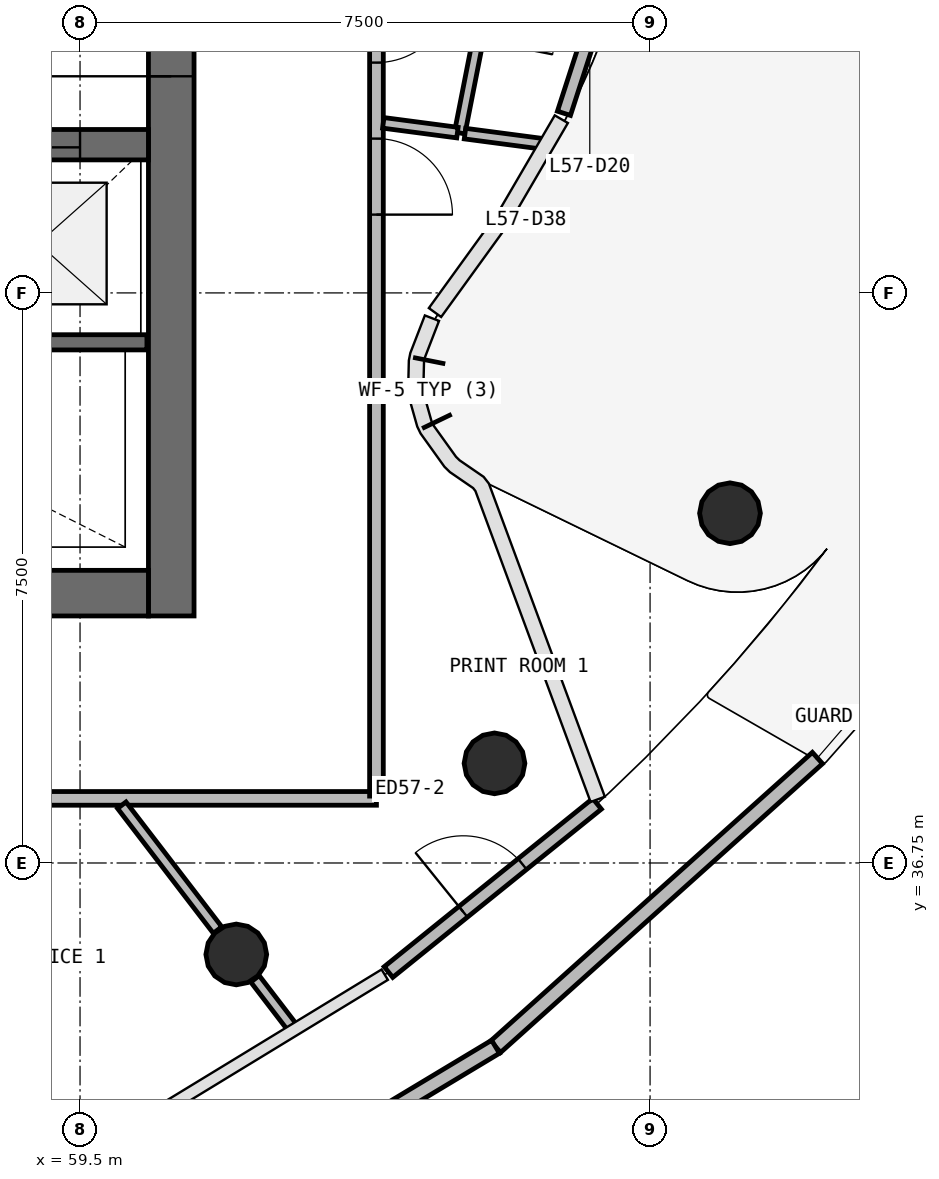
"""IFC4 building model, lengths in metres.
Left out: names, types, materials, properties, quantities, classifications, styles, units other than length and angle.
Written with IfcOpenShell. Run it as: python <this file> out.ifc"""

import sys

from ifc_helpers import new_model, si_unit, direction, frame, frame_2d, origin, origin_2d, place, context, subcontext, project, spatial, rectangle, circle, extrude, source, transform, mapped, element, fill, save


model = new_model("IFC4")
c1 = context("Model", 3, precision=1e-05, world=origin(), true_north=direction((0.0, 1.0)))
c2 = subcontext(c1, "Body", "Model", "MODEL_VIEW")
j1 = project(units=[si_unit("LENGTHUNIT", "METRE"), si_unit("PLANEANGLEUNIT", "RADIAN")], contexts=[c1])
p1 = place(None, origin())
s1 = spatial("IfcSite", under=j1, at=p1, CompositionType="ELEMENT")
p2 = place(p1, origin())
s2 = spatial("IfcBuilding", under=s1, at=p2, CompositionType="ELEMENT")
p3 = place(p2, frame((0.0, 0.0, 234.5)))
s3 = spatial("IfcBuildingStorey", under=s2, at=p3, CompositionType="ELEMENT", Elevation=234.5)
p4 = place(p3, frame((60.7, 40.0, 0.0), z_axis=(0.0, 0.0, 1.0), x_axis=(0.0, 1.0, 0.0)))
e1 = element("IfcWall", 1, at=p4, inside=s3, PredefinedType="SHEAR", context=c2, shape_type="SweptSolid", body=[
    extrude(rectangle(XDim=16.0, YDim=0.6, at=frame_2d((8.0, 0.0))), origin(), (0.0, 0.0, 1.0), 3.9),
])
p5 = place(p4, frame((7.1, 0.0, 0.0)))
e2 = element("IfcOpeningElement", 2, at=p5, cuts=e1, PredefinedType="OPENING", context=c2, shape_type="SweptSolid", body=[
    extrude(rectangle(XDim=1.8, YDim=2.1, at=frame_2d((0.9, 1.05))), frame((0.0, 0.31, 0.0), z_axis=(0.0, -1.0, 0.0), x_axis=(1.0, 0.0, 0.0)), (0.0, 0.0, 1.0), 0.62),
])
p6 = place(p3, frame((43.6, 40.3, 0.0), z_axis=(0.0, 0.0, 1.0), x_axis=(1.0, 0.0, 0.0)))
e3 = element("IfcWall", 3, at=p6, inside=s3, PredefinedType="SHEAR", context=c2, shape_type="SweptSolid", body=[
    extrude(rectangle(XDim=16.8, YDim=0.6, at=frame_2d((8.4, 0.0))), origin(), (0.0, 0.0, 1.0), 3.9),
])
p7 = place(p6, frame((10.3, 0.0, 0.0)))
e4 = element("IfcOpeningElement", 4, at=p7, cuts=e3, PredefinedType="OPENING", context=c2, shape_type="SweptSolid", body=[
    extrude(rectangle(XDim=1.2, YDim=2.1, at=frame_2d((0.6, 1.05))), frame((0.0, 0.31, 0.0), z_axis=(0.0, -1.0, 0.0), x_axis=(1.0, 0.0, 0.0)), (0.0, 0.0, 1.0), 0.62),
])
p8 = place(p6, frame((7.25, 0.0, 0.0)))
e5 = element("IfcOpeningElement", 5, at=p8, cuts=e3, PredefinedType="OPENING", context=c2, shape_type="SweptSolid", body=[
    extrude(rectangle(XDim=1.1, YDim=2.1, at=frame_2d((0.55, 1.05))), frame((0.0, 0.31, 0.0), z_axis=(0.0, -1.0, 0.0), x_axis=(1.0, 0.0, 0.0)), (0.0, 0.0, 1.0), 0.62),
])
p9 = place(p6, frame((0.7, 0.0, 0.0)))
e6 = element("IfcOpeningElement", 6, at=p9, cuts=e3, PredefinedType="OPENING", context=c2, shape_type="SweptSolid", body=[
    extrude(rectangle(XDim=0.8, YDim=2.1, at=frame_2d((0.4, 1.05))), frame((0.0, 0.31, 0.0), z_axis=(0.0, -1.0, 0.0), x_axis=(1.0, 0.0, 0.0)), (0.0, 0.0, 1.0), 0.62),
])
p10 = place(p3, frame((43.6, 46.2, 0.0), z_axis=(0.0, 0.0, 1.0), x_axis=(1.0, 0.0, 0.0)))
e7 = element("IfcWall", 7, at=p10, inside=s3, PredefinedType="SHEAR", context=c2, shape_type="SweptSolid", body=[
    extrude(rectangle(XDim=16.8, YDim=0.4, at=frame_2d((8.4, 0.0))), origin(), (0.0, 0.0, 1.0), 3.9),
])
p11 = place(p10, frame((9.8, 0.0, 0.0)))
e8 = element("IfcOpeningElement", 8, at=p11, cuts=e7, PredefinedType="OPENING", context=c2, shape_type="SweptSolid", body=[
    extrude(rectangle(XDim=1.1, YDim=2.1, at=frame_2d((0.55, 1.05))), frame((0.0, 0.21, 0.0), z_axis=(0.0, -1.0, 0.0), x_axis=(1.0, 0.0, 0.0)), (0.0, 0.0, 1.0), 0.42),
])
p12 = place(p10, frame((12.3, 0.0, 0.0)))
e9 = element("IfcOpeningElement", 9, at=p12, cuts=e7, PredefinedType="OPENING", context=c2, shape_type="SweptSolid", body=[
    extrude(rectangle(XDim=1.1, YDim=2.1, at=frame_2d((0.55, 1.05))), frame((0.0, 0.21, 0.0), z_axis=(0.0, -1.0, 0.0), x_axis=(1.0, 0.0, 0.0)), (0.0, 0.0, 1.0), 0.42),
])
p13 = place(p10, frame((14.8, 0.0, 0.0)))
e10 = element("IfcOpeningElement", 10, at=p13, cuts=e7, PredefinedType="OPENING", context=c2, shape_type="SweptSolid", body=[
    extrude(rectangle(XDim=1.1, YDim=2.1, at=frame_2d((0.55, 1.05))), frame((0.0, 0.21, 0.0), z_axis=(0.0, -1.0, 0.0), x_axis=(1.0, 0.0, 0.0)), (0.0, 0.0, 1.0), 0.42),
])
p14 = place(p10, frame((7.85, 0.0, 0.0)))
e11 = element("IfcOpeningElement", 11, at=p14, cuts=e7, PredefinedType="OPENING", context=c2, shape_type="SweptSolid", body=[
    extrude(rectangle(XDim=0.9, YDim=2.1, at=frame_2d((0.45, 1.05))), frame((0.0, 0.21, 0.0), z_axis=(0.0, -1.0, 0.0), x_axis=(1.0, 0.0, 0.0)), (0.0, 0.0, 1.0), 0.42),
])
m1 = source(origin(), c2, "Body", "SweptSolid", [
    extrude(circle(Radius=0.4, at=origin_2d()), origin(), (0.0, 0.0, 1.0), 4.22),
])
for number, where, z_axis, x_axis in (
    (12, (61.556, 35.547, -0.32), (0.0, 0.0, 1.0), (1.0, 0.0, 0.0)),
    (13, (64.953, 38.061, -0.32), (0.0, 0.0, 1.0), (1.0, 0.0, 0.0)),
    (14, (68.052, 41.351, -0.32), (0.0, 0.0, 1.0), (1.0, 0.0, 0.0)),
):
    element("IfcColumn", number, at=place(p3, frame(where, z_axis=z_axis, x_axis=x_axis)), inside=s3, PredefinedType="COLUMN", context=c2, shape_type="MappedRepresentation", body=[
        mapped(m1, transform((0.0, 0.0, 0.0), scale=1.0)),
    ])
p15 = place(p3, frame((63.558, 35.315, 0.0), z_axis=(0.0, 0.0, 1.0), x_axis=(0.77832244361, 0.627864773477, 0.0)))
e15 = element("IfcWall", 15, at=p15, inside=s3, PredefinedType="STANDARD", context=c2, shape_type="SweptSolid", body=[
    extrude(rectangle(XDim=3.526, YDim=0.18, at=frame_2d((1.763, 0.0))), origin(), (0.0, 0.0, 1.0), 3.328),
])
p16 = place(p15, frame((1.263, 0.0, 0.0)))
e16 = element("IfcOpeningElement", 16, at=p16, cuts=e15, PredefinedType="OPENING", context=c2, shape_type="SweptSolid", body=[
    extrude(rectangle(XDim=1.0, YDim=2.1, at=frame_2d((0.5, 1.05))), frame((0.0, 0.1, 0.0), z_axis=(0.0, -1.0, 0.0), x_axis=(1.0, 0.0, 0.0)), (0.0, 0.0, 1.0), 0.2),
])
p17 = place(p3, frame((65.867, 46.613, 0.0), z_axis=(0.0, 0.0, 1.0), x_axis=(0.308262986163, 0.951301178051, 0.0)))
e17 = element("IfcWall", 17, at=p17, inside=s3, PredefinedType="STANDARD", context=c2, shape_type="SweptSolid", body=[
    extrude(rectangle(XDim=3.656, YDim=0.18, at=frame_2d((1.828, 0.0))), origin(), (0.0, 0.0, 1.0), 3.126),
])
p18 = place(p17, frame((0.928, 0.0, 0.0)))
e18 = element("IfcOpeningElement", 18, at=p18, cuts=e17, PredefinedType="OPENING", context=c2, shape_type="SweptSolid", body=[
    extrude(rectangle(XDim=1.8, YDim=2.4, at=frame_2d((0.9, 1.2))), frame((0.0, 0.1, 0.0), z_axis=(0.0, -1.0, 0.0), x_axis=(1.0, 0.0, 0.0)), (0.0, 0.0, 1.0), 0.2),
])
p19 = place(p3, frame((69.202, 38.131, 0.0), z_axis=(0.0, 0.0, 1.0), x_axis=(-0.744428214978, -0.667702503174, 0.0)))
e19 = element("IfcWall", 19, at=p19, inside=s3, PredefinedType="PARAPET", context=c2, shape_type="SweptSolid", body=[
    extrude(rectangle(XDim=5.689, YDim=0.2, at=frame_2d((2.845, 0.0))), origin(), (0.0, 0.0, 1.0), 1.1),
])
p20 = place(p3, frame((64.967, 34.332, 0.0), z_axis=(0.0, 0.0, 1.0), x_axis=(-0.857208875939, -0.51496887577, 0.0)))
e20 = element("IfcWall", 20, at=p20, inside=s3, PredefinedType="PARAPET", context=c2, shape_type="SweptSolid", body=[
    extrude(rectangle(XDim=5.69, YDim=0.2, at=frame_2d((2.845, 0.0))), origin(), (0.0, 0.0, 1.0), 1.1),
])
p21 = place(p3, frame((57.7, 43.6, 0.0), z_axis=(0.0, 0.0, 1.0), x_axis=(1.0, 0.0, 0.0)))
e21 = element("IfcWall", 21, at=p21, inside=s3, PredefinedType="SOLIDWALL", context=c2, shape_type="SweptSolid", body=[
    extrude(rectangle(XDim=2.68, YDim=0.2, at=frame_2d((1.34, 0.0))), origin(), (0.0, 0.0, 1.0), 3.58),
])
p22 = place(p3, frame((63.4, 37.6, 0.0), z_axis=(0.0, 0.0, 1.0), x_axis=(-1.0, 0.0, 0.0)))
e22 = element("IfcWall", 22, at=p22, inside=s3, PredefinedType="PARTITIONING", context=c2, shape_type="SweptSolid", body=[
    extrude(rectangle(XDim=22.8, YDim=0.18, at=frame_2d((11.4, 0.0))), origin(), (0.0, 0.0, 1.0), 2.88),
])
p23 = place(p22, frame((16.15, 0.0, 0.0)))
e23 = element("IfcOpeningElement", 23, at=p23, cuts=e22, PredefinedType="OPENING", context=c2, shape_type="SweptSolid", body=[
    extrude(rectangle(XDim=1.0, YDim=2.1, at=frame_2d((0.5, 1.05))), frame((0.0, 0.1, 0.0), z_axis=(0.0, -1.0, 0.0), x_axis=(1.0, 0.0, 0.0)), (0.0, 0.0, 1.0), 0.2),
])
p24 = place(p22, frame((10.95, 0.0, 0.0)))
e24 = element("IfcOpeningElement", 24, at=p24, cuts=e22, PredefinedType="OPENING", context=c2, shape_type="SweptSolid", body=[
    extrude(rectangle(XDim=1.0, YDim=2.1, at=frame_2d((0.5, 1.05))), frame((0.0, 0.1, 0.0), z_axis=(0.0, -1.0, 0.0), x_axis=(1.0, 0.0, 0.0)), (0.0, 0.0, 1.0), 0.2),
])
p25 = place(p22, frame((5.75, 0.0, 0.0)))
e25 = element("IfcOpeningElement", 25, at=p25, cuts=e22, PredefinedType="OPENING", context=c2, shape_type="SweptSolid", body=[
    extrude(rectangle(XDim=1.0, YDim=2.1, at=frame_2d((0.5, 1.05))), frame((0.0, 0.1, 0.0), z_axis=(0.0, -1.0, 0.0), x_axis=(1.0, 0.0, 0.0)), (0.0, 0.0, 1.0), 0.2),
])
p26 = place(p3, frame((63.4, 57.812, 0.0), z_axis=(0.0, 0.0, 1.0), x_axis=(0.0, -1.0, 0.0)))
e26 = element("IfcWall", 26, at=p26, inside=s3, PredefinedType="PARTITIONING", context=c2, shape_type="SweptSolid", body=[
    extrude(rectangle(XDim=20.182, YDim=0.18, at=frame_2d((10.091, 0.0))), origin(), (0.0, 0.0, 1.0), 2.88),
])
p27 = place(p26, frame((9.532, 0.0, 0.0)))
e27 = element("IfcOpeningElement", 27, at=p27, cuts=e26, PredefinedType="OPENING", context=c2, shape_type="SweptSolid", body=[
    extrude(rectangle(XDim=1.0, YDim=2.1, at=frame_2d((0.5, 1.05))), frame((0.0, 0.1, 0.0), z_axis=(0.0, -1.0, 0.0), x_axis=(1.0, 0.0, 0.0)), (0.0, 0.0, 1.0), 0.2),
])
p28 = place(p26, frame((11.532, 0.0, 0.0)))
e28 = element("IfcOpeningElement", 28, at=p28, cuts=e26, PredefinedType="OPENING", context=c2, shape_type="SweptSolid", body=[
    extrude(rectangle(XDim=1.0, YDim=2.1, at=frame_2d((0.5, 1.05))), frame((0.0, 0.1, 0.0), z_axis=(0.0, -1.0, 0.0), x_axis=(1.0, 0.0, 0.0)), (0.0, 0.0, 1.0), 0.2),
])
p29 = place(p3, frame((65.154, 49.703, 0.0), z_axis=(0.0, 0.0, 1.0), x_axis=(-0.193102031635, -0.981178681677, 0.0)))
e29 = element("IfcWall", 29, at=p29, inside=s3, PredefinedType="PARTITIONING", context=c2, shape_type="SweptSolid", body=[
    extrude(rectangle(XDim=3.412, YDim=0.14, at=frame_2d((1.706, 0.0))), origin(), (0.0, 0.0, 1.0), 2.88),
])
p30 = place(p29, frame((1.162, 0.0, 0.0)))
e30 = element("IfcOpeningElement", 30, at=p30, cuts=e29, PredefinedType="OPENING", context=c2, shape_type="SweptSolid", body=[
    extrude(rectangle(XDim=1.0, YDim=2.1, at=frame_2d((0.5, 1.05))), frame((0.0, 0.08, 0.0), z_axis=(0.0, -1.0, 0.0), x_axis=(1.0, 0.0, 0.0)), (0.0, 0.0, 1.0), 0.16),
])
p31 = place(p3, frame((63.49, 46.487, 0.0), z_axis=(0.0, 0.0, 1.0), x_axis=(0.991447538325, -0.130505857147, 0.0)))
e31 = element("IfcWall", 31, at=p31, inside=s3, PredefinedType="PARTITIONING", context=c2, shape_type="SweptSolid", body=[
    extrude(rectangle(XDim=0.984, YDim=0.14, at=frame_2d((0.492, 0.0))), origin(), (0.0, 0.0, 1.0), 2.88),
])
p32 = place(p3, frame((64.565, 46.346, 0.0), z_axis=(0.0, 0.0, 1.0), x_axis=(0.991447064532, -0.130509456483, 0.0)))
e32 = element("IfcWall", 32, at=p32, inside=s3, PredefinedType="PARTITIONING", context=c2, shape_type="SweptSolid", body=[
    extrude(rectangle(XDim=1.034, YDim=0.14, at=frame_2d((0.517, 0.0))), origin(), (0.0, 0.0, 1.0), 2.88),
])
p33 = place(p3, frame((60.049, 37.51, 0.0), z_axis=(0.0, 0.0, 1.0), x_axis=(0.608701397958, -0.793399400128, 0.0)))
e33 = element("IfcWall", 33, at=p33, inside=s3, PredefinedType="PARTITIONING", context=c2, shape_type="SweptSolid", body=[
    extrude(rectangle(XDim=2.07, YDim=0.14, at=frame_2d((1.035, 0.0))), origin(), (0.0, 0.0, 1.0), 2.88),
])
p34 = place(p3, frame((61.802, 35.226, 0.0), z_axis=(0.0, 0.0, 1.0), x_axis=(0.608755530265, -0.793357866522, 0.0)))
e34 = element("IfcWall", 34, at=p34, inside=s3, PredefinedType="PARTITIONING", context=c2, shape_type="SweptSolid", body=[
    extrude(rectangle(XDim=0.791, YDim=0.14, at=frame_2d((0.396, 0.0))), origin(), (0.0, 0.0, 1.0), 2.88),
])
m2 = source(origin(), c2, "Body", "SweptSolid", [
    extrude(rectangle(XDim=1.0, YDim=2.1, at=frame_2d((0.5, 1.05))), frame((0.0, 0.025, 0.0), z_axis=(0.0, -1.0, 0.0), x_axis=(1.0, 0.0, 0.0)), (0.0, 0.0, 1.0), 0.05),
])
p35 = place(p16, origin())
e35 = element("IfcDoor", 35, at=p35, inside=s3, OperationType="SINGLE_SWING_LEFT", PredefinedType="DOOR", context=c2, shape_type="MappedRepresentation", body=[
    mapped(m2, transform((0.0, 0.0, 0.0), scale=1.0)),
])
fill(e16, e35)
m3 = source(origin(), c2, "Body", "SweptSolid", [
    extrude(rectangle(XDim=1.8, YDim=2.1, at=frame_2d((0.9, 1.05))), frame((0.0, 0.025, 0.0), z_axis=(0.0, -1.0, 0.0), x_axis=(1.0, 0.0, 0.0)), (0.0, 0.0, 1.0), 0.05),
])
p36 = place(p5, origin())
e36 = element("IfcDoor", 36, at=p36, inside=s3, OperationType="SINGLE_SWING_LEFT", PredefinedType="DOOR", context=c2, shape_type="MappedRepresentation", body=[
    mapped(m3, transform((0.0, 0.0, 0.0), scale=1.0)),
])
fill(e2, e36)
m4 = source(origin(), c2, "Body", "SweptSolid", [
    extrude(rectangle(XDim=1.1, YDim=2.1, at=frame_2d((0.55, 1.05))), frame((0.0, 0.025, 0.0), z_axis=(0.0, -1.0, 0.0), x_axis=(1.0, 0.0, 0.0)), (0.0, 0.0, 1.0), 0.05),
])
p37 = place(p13, origin())
e37 = element("IfcDoor", 37, at=p37, inside=s3, OperationType="DOUBLE_DOOR_SLIDING", PredefinedType="USERDEFINED", context=c2, shape_type="MappedRepresentation", body=[
    mapped(m4, transform((0.0, 0.0, 0.0), scale=1.0)),
])
fill(e10, e37)
m5 = source(origin(), c2, "Body", "SweptSolid", [
    extrude(rectangle(XDim=1.0, YDim=2.1, at=frame_2d((0.5, 1.05))), frame((0.0, 0.025, 0.0), z_axis=(0.0, -1.0, 0.0), x_axis=(1.0, 0.0, 0.0)), (0.0, 0.0, 1.0), 0.05),
])
p38 = place(p27, origin())
e38 = element("IfcDoor", 38, at=p38, inside=s3, OperationType="SINGLE_SWING_LEFT", PredefinedType="DOOR", context=c2, shape_type="MappedRepresentation", body=[
    mapped(m5, transform((0.0, 0.0, 0.0), scale=1.0)),
])
fill(e27, e38)
p39 = place(p28, origin())
e39 = element("IfcDoor", 39, at=p39, inside=s3, OperationType="SINGLE_SWING_RIGHT", PredefinedType="DOOR", context=c2, shape_type="MappedRepresentation", body=[
    mapped(m5, transform((0.0, 0.0, 0.0), scale=1.0)),
])
fill(e28, e39)
save(model, sys.argv[1])
